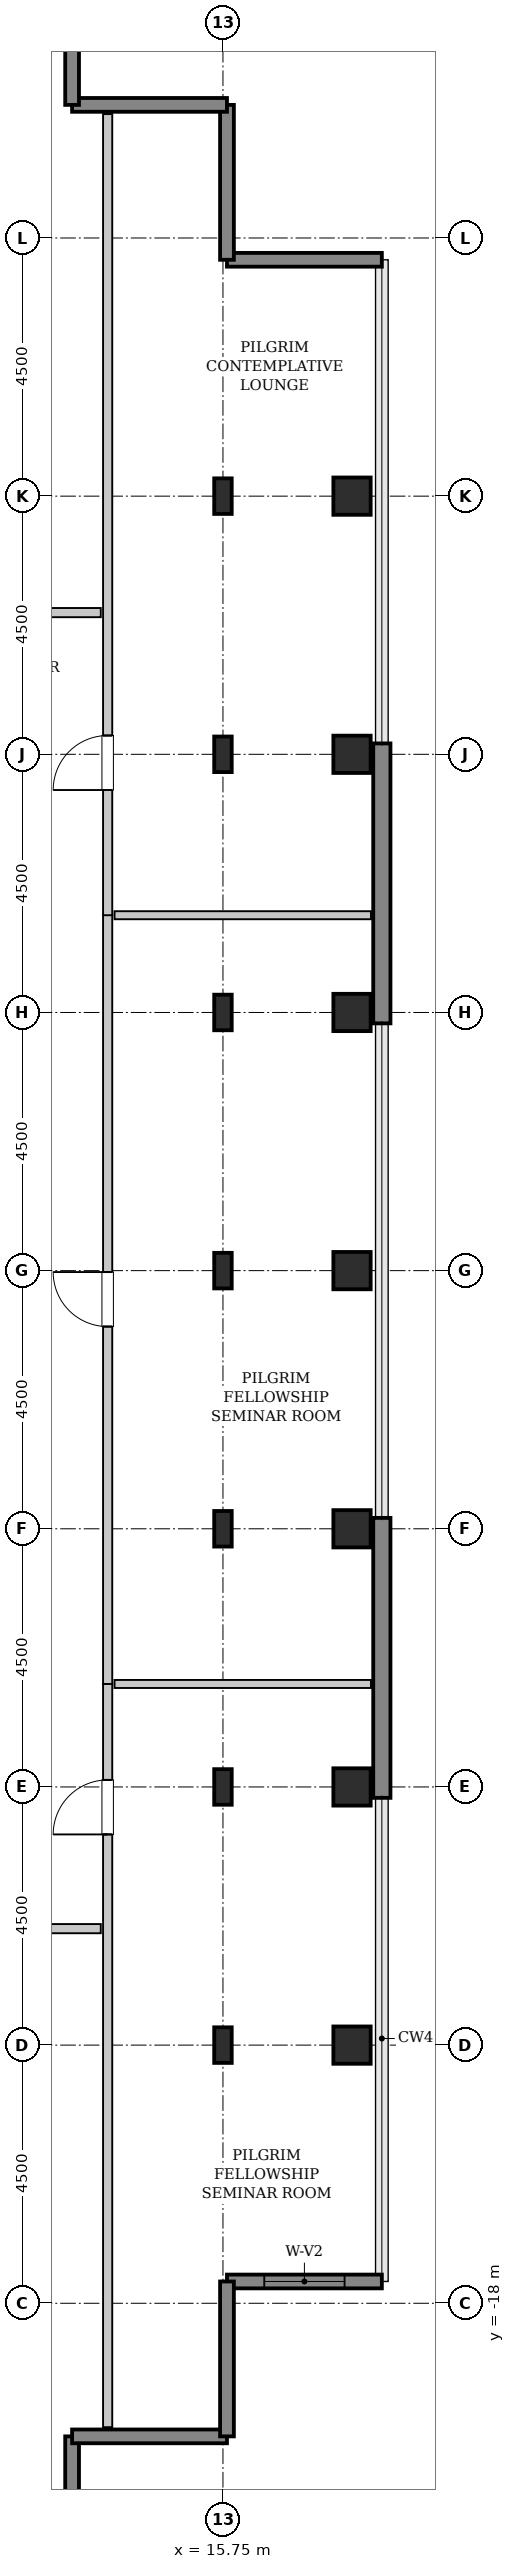
"""IFC4 building model, lengths in metres.
Left out: names, types, materials, properties, quantities, classifications, styles, units other than length and angle.
Written with IfcOpenShell. Run it as: python <this file> out.ifc"""

import sys

from ifc_helpers import new_model, si_unit, direction, frame, frame_2d, origin, origin_2d, place, context, subcontext, project, spatial, rectangle, hollow_rectangle, i_section, extrude, source, transform, mapped, element, fill, save


model = new_model("IFC4")
c1 = context("Model", 3, precision=1e-05, world=origin(), true_north=direction((0.0, 1.0)))
c2 = subcontext(c1, "Body", "Model", "MODEL_VIEW")
j1 = project(units=[si_unit("LENGTHUNIT", "METRE"), si_unit("PLANEANGLEUNIT", "RADIAN")], contexts=[c1])
p1 = place(None, origin())
s1 = spatial("IfcSite", under=j1, at=p1, CompositionType="ELEMENT")
p2 = place(p1, origin())
s2 = spatial("IfcBuilding", under=s1, at=p2, CompositionType="ELEMENT")
p3 = place(p2, frame((0.0, 0.0, 276.0)))
s3 = spatial("IfcBuildingStorey", under=s2, at=p3, CompositionType="ELEMENT", Elevation=276.0)
m1 = source(origin(), c2, "Body", "SweptSolid", [
    extrude(i_section(OverallWidth=0.305, OverallDepth=0.62, WebThickness=0.021, FlangeThickness=0.04, FilletRadius=0.027, at=origin_2d()), origin(), (0.0, 0.0, 1.0), 3.8),
])
for number, where, z_axis, x_axis in (
    (1, (15.75, -13.5, 0.0), (0.0, 0.0, 1.0), (1.0, 0.0, 0.0)),
    (2, (15.75, -9.0, 0.0), (0.0, 0.0, 1.0), (1.0, 0.0, 0.0)),
    (3, (15.75, -4.5, 0.0), (0.0, 0.0, 1.0), (1.0, 0.0, 0.0)),
    (4, (15.75, 0.0, 0.0), (0.0, 0.0, 1.0), (1.0, 0.0, 0.0)),
    (5, (15.75, 4.5, 0.0), (0.0, 0.0, 1.0), (1.0, 0.0, 0.0)),
    (6, (15.75, 9.0, 0.0), (0.0, 0.0, 1.0), (1.0, 0.0, 0.0)),
    (7, (15.75, 13.5, 0.0), (0.0, 0.0, 1.0), (1.0, 0.0, 0.0)),
):
    element("IfcColumn", number, at=place(p3, frame(where, z_axis=z_axis, x_axis=x_axis)), inside=s3, PredefinedType="COLUMN", context=c2, shape_type="MappedRepresentation", body=[
        mapped(m1, transform((0.0, 0.0, 0.0), x_axis=(1.0, 0.0, 0.0), y_axis=(0.0, 1.0, 0.0), z_axis=(0.0, 0.0, 1.0), scale=1.0)),
    ])
m2 = source(origin(), c2, "Body", "SweptSolid", [
    extrude(hollow_rectangle(XDim=0.65, YDim=0.65, WallThickness=0.032, InnerFilletRadius=0.032, OuterFilletRadius=0.064, at=origin_2d()), origin(), (0.0, 0.0, 1.0), 3.8),
])
for number, where, z_axis, x_axis in (
    (8, (18.0, -13.5, 0.0), (0.0, 0.0, 1.0), (1.0, 0.0, 0.0)),
    (9, (18.0, -9.0, 0.0), (0.0, 0.0, 1.0), (1.0, 0.0, 0.0)),
    (10, (18.0, -4.5, 0.0), (0.0, 0.0, 1.0), (1.0, 0.0, 0.0)),
    (11, (18.0, 0.0, 0.0), (0.0, 0.0, 1.0), (1.0, 0.0, 0.0)),
    (12, (18.0, 4.5, 0.0), (0.0, 0.0, 1.0), (1.0, 0.0, 0.0)),
    (13, (18.0, 9.0, 0.0), (0.0, 0.0, 1.0), (1.0, 0.0, 0.0)),
    (14, (18.0, 13.5, 0.0), (0.0, 0.0, 1.0), (1.0, 0.0, 0.0)),
):
    element("IfcColumn", number, at=place(p3, frame(where, z_axis=z_axis, x_axis=x_axis)), inside=s3, PredefinedType="COLUMN", context=c2, shape_type="MappedRepresentation", body=[
        mapped(m2, transform((0.0, 0.0, 0.0), x_axis=(1.0, 0.0, 0.0), y_axis=(0.0, 1.0, 0.0), z_axis=(0.0, 0.0, 1.0), scale=1.0)),
    ])
m3 = source(origin(), c2, "Body", "SweptSolid", [
    extrude(rectangle(XDim=4.88, YDim=0.3, at=frame_2d((2.44, 0.0))), origin(), (0.0, 0.0, 1.0), 3.55),
])
for number, where, z_axis, x_axis in (
    (15, (18.52, -9.19, 0.0), (0.0, 0.0, 1.0), (0.0, 1.0, 0.0)),
    (16, (18.52, 4.31, 0.0), (0.0, 0.0, 1.0), (0.0, 1.0, 0.0)),
):
    element("IfcWall", number, at=place(p3, frame(where, z_axis=z_axis, x_axis=x_axis)), inside=s3, PredefinedType="SHEAR", context=c2, shape_type="MappedRepresentation", body=[
        mapped(m3, transform((0.0, 0.0, 0.0), x_axis=(1.0, 0.0, 0.0), y_axis=(0.0, 1.0, 0.0), z_axis=(0.0, 0.0, 1.0), scale=1.0)),
    ])
m4 = source(origin(), c2, "Body", "SweptSolid", [
    extrude(rectangle(XDim=2.7, YDim=0.24, at=frame_2d((1.35, 0.0))), origin(), (0.0, 0.0, 1.0), 3.55),
])
p4 = place(p3, frame((15.82, -17.62, 0.0), z_axis=(0.0, 0.0, 1.0), x_axis=(1.0, 0.0, 0.0)))
e17 = element("IfcWall", 17, at=p4, inside=s3, PredefinedType="SHEAR", context=c2, shape_type="MappedRepresentation", body=[
    mapped(m4, transform((0.0, 0.0, 0.0), x_axis=(1.0, 0.0, 0.0), y_axis=(0.0, 1.0, 0.0), z_axis=(0.0, 0.0, 1.0), scale=1.0)),
])
p5 = place(p4, frame((0.65, 0.0, 0.85)))
e18 = element("IfcOpeningElement", 18, at=p5, cuts=e17, PredefinedType="OPENING", context=c2, shape_type="SweptSolid", body=[
    extrude(rectangle(XDim=1.4, YDim=1.8, at=frame_2d((0.7, 0.9))), frame((0.0, 0.13, 0.0), z_axis=(0.0, -1.0, 0.0), x_axis=(1.0, 0.0, 0.0)), (0.0, 0.0, 1.0), 0.26),
])
for number, where, z_axis, x_axis in (
    (19, (18.52, 17.62, 0.0), (0.0, 0.0, 1.0), (-1.0, 0.0, 0.0)),
    (20, (15.82, 17.62, 0.0), (0.0, 0.0, 1.0), (0.0, 1.0, 0.0)),
    (21, (15.82, 20.32, 0.0), (0.0, 0.0, 1.0), (-1.0, 0.0, 0.0)),
    (22, (13.12, 20.32, 0.0), (0.0, 0.0, 1.0), (0.0, 1.0, 0.0)),
    (23, (13.12, -23.02, 0.0), (0.0, 0.0, 1.0), (0.0, 1.0, 0.0)),
    (24, (13.12, -20.32, 0.0), (0.0, 0.0, 1.0), (1.0, 0.0, 0.0)),
    (25, (15.82, -20.32, 0.0), (0.0, 0.0, 1.0), (0.0, 1.0, 0.0)),
):
    element("IfcWall", number, at=place(p3, frame(where, z_axis=z_axis, x_axis=x_axis)), inside=s3, PredefinedType="SHEAR", context=c2, shape_type="MappedRepresentation", body=[
        mapped(m4, transform((0.0, 0.0, 0.0), x_axis=(1.0, 0.0, 0.0), y_axis=(0.0, 1.0, 0.0), z_axis=(0.0, 0.0, 1.0), scale=1.0)),
    ])
m5 = source(origin(), c2, "Body", "SweptSolid", [
    extrude(rectangle(XDim=12.965, YDim=0.16, at=frame_2d((6.482, 0.0))), origin(), (0.0, 0.0, 1.0), 3.535),
])
p6 = place(p3, frame((13.74, -20.16, 0.0), z_axis=(0.0, 0.0, 1.0), x_axis=(0.0, 1.0, 0.0)))
e26 = element("IfcWall", 26, at=p6, inside=s3, PredefinedType="PARTITIONING", context=c2, shape_type="MappedRepresentation", body=[
    mapped(m5, transform((0.0, 0.0, 0.0), x_axis=(1.0, 0.0, 0.0), y_axis=(0.0, 1.0, 0.0), z_axis=(0.0, 0.0, 1.0), scale=1.0)),
])
p7 = place(p6, frame((10.333, 0.0, 0.0)))
e27 = element("IfcOpeningElement", 27, at=p7, cuts=e26, PredefinedType="OPENING", context=c2, shape_type="SweptSolid", body=[
    extrude(rectangle(XDim=0.95, YDim=2.1, at=frame_2d((0.475, 1.05))), frame((0.0, 0.09, 0.0), z_axis=(0.0, -1.0, 0.0), x_axis=(1.0, 0.0, 0.0)), (0.0, 0.0, 1.0), 0.18),
])
m6 = source(origin(), c2, "Body", "SweptSolid", [
    extrude(rectangle(XDim=4.47, YDim=0.14, at=frame_2d((2.235, 0.0))), origin(), (0.0, 0.0, 1.0), 3.535),
])
p8 = place(p3, frame((13.86, -7.205, 0.0), z_axis=(0.0, 0.0, 1.0), x_axis=(1.0, 0.0, 0.0)))
e28 = element("IfcWall", 28, at=p8, inside=s3, PredefinedType="PARTITIONING", context=c2, shape_type="MappedRepresentation", body=[
    mapped(m6, transform((0.0, 0.0, 0.0), x_axis=(1.0, 0.0, 0.0), y_axis=(0.0, 1.0, 0.0), z_axis=(0.0, 0.0, 1.0), scale=1.0)),
])
m7 = source(origin(), c2, "Body", "SweptSolid", [
    extrude(rectangle(XDim=13.41, YDim=0.16, at=frame_2d((6.705, 0.0))), origin(), (0.0, 0.0, 1.0), 3.535),
])
p9 = place(p3, frame((13.74, -7.205, 0.0), z_axis=(0.0, 0.0, 1.0), x_axis=(0.0, 1.0, 0.0)))
e29 = element("IfcWall", 29, at=p9, inside=s3, PredefinedType="PARTITIONING", context=c2, shape_type="MappedRepresentation", body=[
    mapped(m7, transform((0.0, 0.0, 0.0), x_axis=(1.0, 0.0, 0.0), y_axis=(0.0, 1.0, 0.0), z_axis=(0.0, 0.0, 1.0), scale=1.0)),
])
p10 = place(p9, frame((6.23, 0.0, 0.0)))
e30 = element("IfcOpeningElement", 30, at=p10, cuts=e29, PredefinedType="OPENING", context=c2, shape_type="SweptSolid", body=[
    extrude(rectangle(XDim=0.95, YDim=2.1, at=frame_2d((0.475, 1.05))), frame((0.0, 0.09, 0.0), z_axis=(0.0, -1.0, 0.0), x_axis=(1.0, 0.0, 0.0)), (0.0, 0.0, 1.0), 0.18),
])
p11 = place(p3, frame((13.86, 6.195, 0.0), z_axis=(0.0, 0.0, 1.0), x_axis=(1.0, 0.0, 0.0)))
e31 = element("IfcWall", 31, at=p11, inside=s3, PredefinedType="PARTITIONING", context=c2, shape_type="MappedRepresentation", body=[
    mapped(m6, transform((0.0, 0.0, 0.0), x_axis=(1.0, 0.0, 0.0), y_axis=(0.0, 1.0, 0.0), z_axis=(0.0, 0.0, 1.0), scale=1.0)),
])
m8 = source(origin(), c2, "Body", "SweptSolid", [
    extrude(rectangle(XDim=13.965, YDim=0.16, at=frame_2d((6.982, 0.0))), origin(), (0.0, 0.0, 1.0), 3.535),
])
p12 = place(p3, frame((13.74, 6.195, 0.0), z_axis=(0.0, 0.0, 1.0), x_axis=(0.0, 1.0, 0.0)))
e32 = element("IfcWall", 32, at=p12, inside=s3, PredefinedType="PARTITIONING", context=c2, shape_type="MappedRepresentation", body=[
    mapped(m8, transform((0.0, 0.0, 0.0), x_axis=(1.0, 0.0, 0.0), y_axis=(0.0, 1.0, 0.0), z_axis=(0.0, 0.0, 1.0), scale=1.0)),
])
p13 = place(p12, frame((2.183, 0.0, 0.0)))
e33 = element("IfcOpeningElement", 33, at=p13, cuts=e32, PredefinedType="OPENING", context=c2, shape_type="SweptSolid", body=[
    extrude(rectangle(XDim=0.95, YDim=2.1, at=frame_2d((0.475, 1.05))), frame((0.0, 0.09, 0.0), z_axis=(0.0, -1.0, 0.0), x_axis=(1.0, 0.0, 0.0)), (0.0, 0.0, 1.0), 0.18),
])
m9 = source(origin(), c2, "Body", "SweptSolid", [
    extrude(rectangle(XDim=6.825, YDim=0.16, at=frame_2d((3.413, 0.0))), origin(), (0.0, 0.0, 1.0), 3.535),
])
p14 = place(p3, frame((6.795, 11.47, 0.0), z_axis=(0.0, 0.0, 1.0), x_axis=(1.0, 0.0, 0.0)))
e34 = element("IfcWall", 34, at=p14, inside=s3, PredefinedType="PARTITIONING", context=c2, shape_type="MappedRepresentation", body=[
    mapped(m9, transform((0.0, 0.0, 0.0), x_axis=(1.0, 0.0, 0.0), y_axis=(0.0, 1.0, 0.0), z_axis=(0.0, 0.0, 1.0), scale=1.0)),
])
p15 = place(p14, frame((2.938, 0.0, 0.0)))
e35 = element("IfcOpeningElement", 35, at=p15, cuts=e34, PredefinedType="OPENING", context=c2, shape_type="SweptSolid", body=[
    extrude(rectangle(XDim=0.95, YDim=2.1, at=frame_2d((0.475, 1.05))), frame((0.0, 0.09, 0.0), z_axis=(0.0, -1.0, 0.0), x_axis=(1.0, 0.0, 0.0)), (0.0, 0.0, 1.0), 0.18),
])
m10 = source(origin(), c2, "Body", "SweptSolid", [
    extrude(rectangle(XDim=6.025, YDim=0.16, at=frame_2d((3.013, 0.0))), origin(), (0.0, 0.0, 1.0), 3.535),
])
p16 = place(p3, frame((7.595, -11.47, 0.0), z_axis=(0.0, 0.0, 1.0), x_axis=(1.0, 0.0, 0.0)))
e36 = element("IfcWall", 36, at=p16, inside=s3, PredefinedType="PARTITIONING", context=c2, shape_type="MappedRepresentation", body=[
    mapped(m10, transform((0.0, 0.0, 0.0), x_axis=(1.0, 0.0, 0.0), y_axis=(0.0, 1.0, 0.0), z_axis=(0.0, 0.0, 1.0), scale=1.0)),
])
p17 = place(p16, frame((2.538, 0.0, 0.0)))
e37 = element("IfcOpeningElement", 37, at=p17, cuts=e36, PredefinedType="OPENING", context=c2, shape_type="SweptSolid", body=[
    extrude(rectangle(XDim=0.95, YDim=2.1, at=frame_2d((0.475, 1.05))), frame((0.0, 0.09, 0.0), z_axis=(0.0, -1.0, 0.0), x_axis=(1.0, 0.0, 0.0)), (0.0, 0.0, 1.0), 0.18),
])
m11 = source(origin(), c2, "Body", "SweptSolid", [
    extrude(rectangle(XDim=1.4, YDim=1.8, at=frame_2d((0.7, 0.9))), frame((0.0, 0.03, 0.0), z_axis=(0.0, -1.0, 0.0), x_axis=(1.0, 0.0, 0.0)), (0.0, 0.0, 1.0), 0.06),
])
p18 = place(p5, origin())
e38 = element("IfcWindow", 38, at=p18, inside=s3, PartitioningType="SINGLE_PANEL", PredefinedType="WINDOW", context=c2, shape_type="MappedRepresentation", body=[
    mapped(m11, transform((0.0, 0.0, 0.0), x_axis=(1.0, 0.0, 0.0), y_axis=(0.0, 1.0, 0.0), z_axis=(0.0, 0.0, 1.0), scale=1.0)),
])
fill(e18, e38)
m12 = source(origin(), c2, "Body", "SweptSolid", [
    extrude(rectangle(XDim=0.95, YDim=2.1, at=frame_2d((0.475, 1.05))), frame((0.0, 0.025, 0.0), z_axis=(0.0, -1.0, 0.0), x_axis=(1.0, 0.0, 0.0)), (0.0, 0.0, 1.0), 0.05),
])
p19 = place(p7, origin())
e39 = element("IfcDoor", 39, at=p19, inside=s3, OperationType="SINGLE_SWING_LEFT", PredefinedType="DOOR", context=c2, shape_type="MappedRepresentation", body=[
    mapped(m12, transform((0.0, 0.0, 0.0), x_axis=(1.0, 0.0, 0.0), y_axis=(0.0, 1.0, 0.0), z_axis=(0.0, 0.0, 1.0), scale=1.0)),
])
fill(e27, e39)
p20 = place(p10, origin())
e40 = element("IfcDoor", 40, at=p20, inside=s3, OperationType="SINGLE_SWING_RIGHT", PredefinedType="DOOR", context=c2, shape_type="MappedRepresentation", body=[
    mapped(m12, transform((0.0, 0.0, 0.0), x_axis=(1.0, 0.0, 0.0), y_axis=(0.0, 1.0, 0.0), z_axis=(0.0, 0.0, 1.0), scale=1.0)),
])
fill(e30, e40)
p21 = place(p13, origin())
e41 = element("IfcDoor", 41, at=p21, inside=s3, OperationType="SINGLE_SWING_LEFT", PredefinedType="DOOR", context=c2, shape_type="MappedRepresentation", body=[
    mapped(m12, transform((0.0, 0.0, 0.0), x_axis=(1.0, 0.0, 0.0), y_axis=(0.0, 1.0, 0.0), z_axis=(0.0, 0.0, 1.0), scale=1.0)),
])
fill(e33, e41)
save(model, sys.argv[1])
